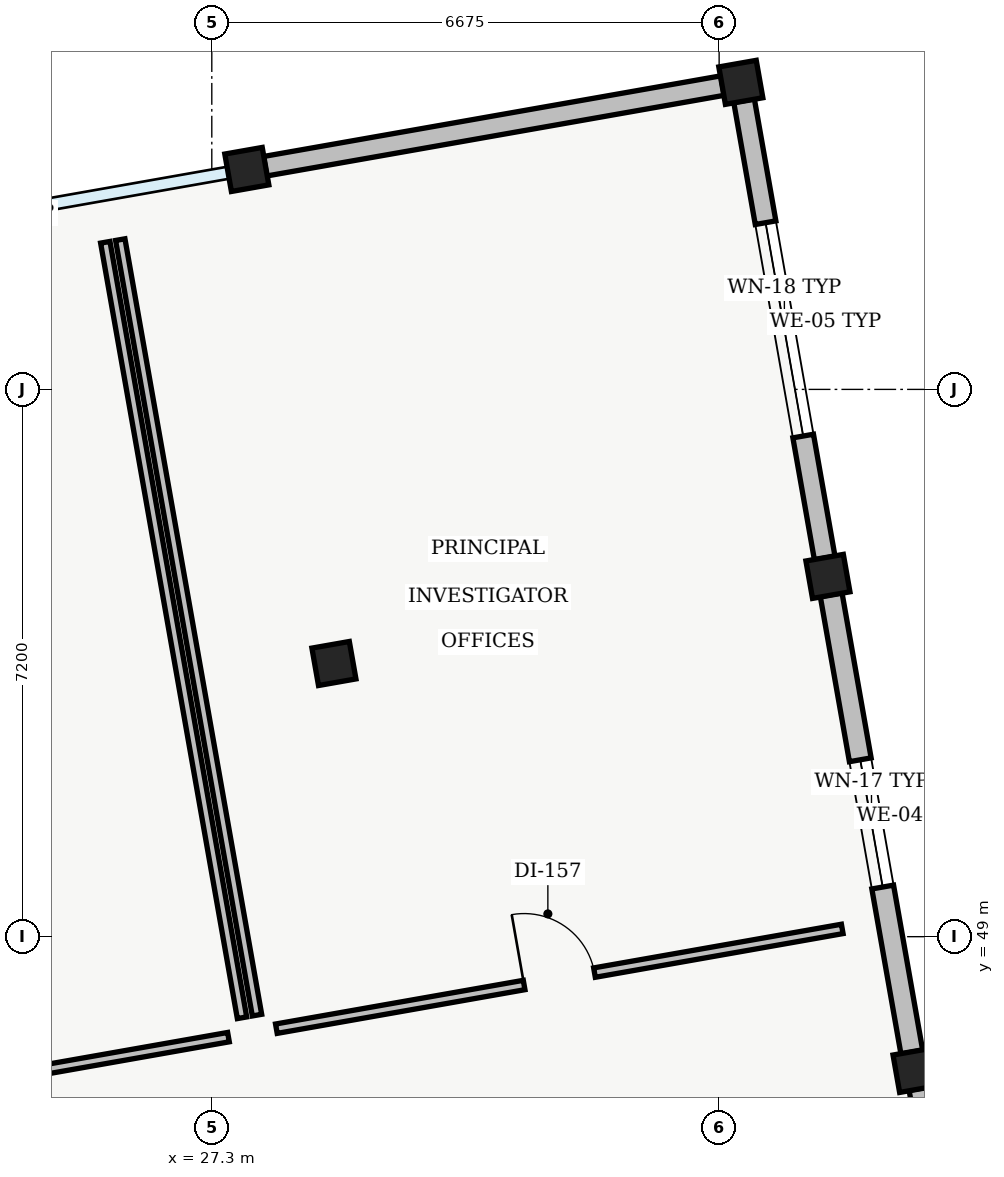
"""IFC4 building model, lengths in metres.
Left out: names, types, materials, properties, quantities, classifications, styles, units other than length and angle.
Written with IfcOpenShell. Run it as: python <this file> out.ifc"""

import sys

from ifc_helpers import new_model, si_unit, direction, frame, frame_2d, origin, origin_2d, place, context, subcontext, project, spatial, rectangle, extrude, element, fill, save


model = new_model("IFC4")
c1 = context("Model", 3, precision=1e-05, world=origin(), true_north=direction((0.0, 1.0)))
c2 = subcontext(c1, "Body", "Model", "MODEL_VIEW")
j1 = project(units=[si_unit("LENGTHUNIT", "METRE"), si_unit("PLANEANGLEUNIT", "RADIAN")], contexts=[c1])
p1 = place(None, origin())
s1 = spatial("IfcSite", under=j1, at=p1, CompositionType="ELEMENT")
p2 = place(p1, origin())
s2 = spatial("IfcBuilding", under=s1, at=p2, CompositionType="ELEMENT")
p3 = place(p2, frame((0.0, 0.0, 40.8)))
s3 = spatial("IfcBuildingStorey", under=s2, at=p3, CompositionType="ELEMENT", Elevation=40.8)
for number, where, z_axis, x_axis in (
    (1, (28.907, 52.594, 0.0), (0.0, 0.0, 1.0), (0.985, 0.174, 0.0)),
    (2, (27.761, 59.094, 0.0), (0.0, 0.0, 1.0), (0.985, 0.174, 0.0)),
    (3, (36.552, 47.24, 0.0), (0.0, 0.0, 1.0), (0.985, 0.174, 0.0)),
    (4, (35.406, 53.74, 0.0), (0.0, 0.0, 1.0), (0.985, 0.174, 0.0)),
    (5, (34.26, 60.24, 0.0), (0.0, 0.0, 1.0), (0.985, 0.174, 0.0)),
):
    element("IfcColumn", number, at=place(p3, frame(where, z_axis=z_axis, x_axis=x_axis)), inside=s3, PredefinedType="COLUMN", context=c2, shape_type="SweptSolid", body=[
        extrude(rectangle(XDim=0.5, YDim=0.5, at=origin_2d()), origin(), (0.0, 0.0, 1.0), 4.01),
    ])
p4 = place(p3, frame((28.002, 59.136, 0.0), z_axis=(0.0, 0.0, 1.0), x_axis=(0.98480607723, 0.173657681232, 0.0)))
e6 = element("IfcWall", 6, at=p4, inside=s3, PredefinedType="STANDARD", context=c2, shape_type="SweptSolid", body=[
    extrude(rectangle(XDim=6.11, YDim=0.26, at=frame_2d((3.055, 0.0))), origin(), (0.0, 0.0, 1.0), 3.495),
])
p5 = place(p3, frame((34.303, 59.998, 0.0), z_axis=(0.0, 0.0, 1.0), x_axis=(0.173657681232, -0.98480607723, 0.0)))
e7 = element("IfcWall", 7, at=p5, inside=s3, PredefinedType="STANDARD", context=c2, shape_type="SweptSolid", body=[
    extrude(rectangle(XDim=6.11, YDim=0.275, at=frame_2d((3.055, 0.0))), origin(), (0.0, 0.0, 1.0), 3.495),
])
p6 = place(p5, frame((1.63, 0.0, 0.95)))
e8 = element("IfcOpeningElement", 8, at=p6, cuts=e7, PredefinedType="OPENING", context=c2, shape_type="SweptSolid", body=[
    extrude(rectangle(XDim=2.85, YDim=1.5, at=frame_2d((1.425, 0.75))), frame((0.0, 0.137, 0.0), z_axis=(0.0, -1.0, 0.0), x_axis=(1.0, 0.0, 0.0)), (0.0, 0.0, 1.0), 0.275),
])
p7 = place(p3, frame((35.449, 53.499, 0.0), z_axis=(0.0, 0.0, 1.0), x_axis=(0.173657681232, -0.98480607723, 0.0)))
e9 = element("IfcWall", 9, at=p7, inside=s3, PredefinedType="STANDARD", context=c2, shape_type="SweptSolid", body=[
    extrude(rectangle(XDim=6.11, YDim=0.29, at=frame_2d((3.055, 0.0))), origin(), (0.0, 0.0, 1.0), 3.495),
])
p8 = place(p7, frame((2.205, 0.0, 0.95)))
e10 = element("IfcOpeningElement", 10, at=p8, cuts=e9, PredefinedType="OPENING", context=c2, shape_type="SweptSolid", body=[
    extrude(rectangle(XDim=1.7, YDim=1.55, at=frame_2d((0.85, 0.775))), frame((0.0, 0.145, 0.0), z_axis=(0.0, -1.0, 0.0), x_axis=(1.0, 0.0, 0.0)), (0.0, 0.0, 1.0), 0.29),
])
p9 = place(p3, frame((36.595, 46.999, 0.0), z_axis=(0.0, 0.0, 1.0), x_axis=(0.173618927794, -0.984812910106, 0.0)))
e11 = element("IfcWall", 11, at=p9, inside=s3, PredefinedType="STANDARD", context=c2, shape_type="SweptSolid", body=[
    extrude(rectangle(XDim=6.11, YDim=0.245, at=frame_2d((3.055, 0.0))), origin(), (0.0, 0.0, 1.0), 3.495),
])
p10 = place(p9, frame((2.48, 0.0, 0.95)))
e12 = element("IfcOpeningElement", 12, at=p10, cuts=e11, PredefinedType="OPENING", context=c2, shape_type="SweptSolid", body=[
    extrude(rectangle(XDim=1.15, YDim=1.6, at=frame_2d((0.575, 0.8))), frame((0.0, 0.123, 0.0), z_axis=(0.0, -1.0, 0.0), x_axis=(1.0, 0.0, 0.0)), (0.0, 0.0, 1.0), 0.245),
])
p11 = place(p3, frame((20.665, 46.469, 0.0), z_axis=(0.0, 0.0, 1.0), x_axis=(0.984804033539, 0.173669270527, 0.0)))
e13 = element("IfcWall", 13, at=p11, inside=s3, PredefinedType="PARTITIONING", context=c2, shape_type="SweptSolid", body=[
    extrude(rectangle(XDim=6.96, YDim=0.125, at=frame_2d((3.48, 0.0))), origin(), (0.0, 0.0, 1.0), 3.65),
])
p12 = place(p11, frame((3.01, 0.0, 0.0)))
e14 = element("IfcOpeningElement", 14, at=p12, cuts=e13, PredefinedType="OPENING", context=c2, shape_type="SweptSolid", body=[
    extrude(rectangle(XDim=0.94, YDim=2.12, at=frame_2d((0.47, 1.06))), frame((0.0, 0.062, 0.0), z_axis=(0.0, -1.0, 0.0), x_axis=(1.0, 0.0, 0.0)), (0.0, 0.0, 1.0), 0.125),
])
p13 = place(p3, frame((27.698, 47.933, 0.0), z_axis=(0.0, 0.0, 1.0), x_axis=(-0.173654930775, 0.984806562233, 0.0)))
e15 = element("IfcWall", 15, at=p13, inside=s3, PredefinedType="PARTITIONING", context=c2, shape_type="SweptSolid", body=[
    extrude(rectangle(XDim=10.36, YDim=0.125, at=frame_2d((5.18, 0.0))), origin(), (0.0, 0.0, 1.0), 3.65),
])
p14 = place(p3, frame((28.15, 47.789, 0.0), z_axis=(0.0, 0.0, 1.0), x_axis=(0.984808257094, 0.173645318852, 0.0)))
e16 = element("IfcWall", 16, at=p14, inside=s3, PredefinedType="PARTITIONING", context=c2, shape_type="SweptSolid", body=[
    extrude(rectangle(XDim=7.56, YDim=0.125, at=frame_2d((3.78, 0.0))), origin(), (0.0, 0.0, 1.0), 3.65),
])
p15 = place(p14, frame((3.31, 0.0, 0.0)))
e17 = element("IfcOpeningElement", 17, at=p15, cuts=e16, PredefinedType="OPENING", context=c2, shape_type="SweptSolid", body=[
    extrude(rectangle(XDim=0.94, YDim=2.12, at=frame_2d((0.47, 1.06))), frame((0.0, 0.062, 0.0), z_axis=(0.0, -1.0, 0.0), x_axis=(1.0, 0.0, 0.0)), (0.0, 0.0, 1.0), 0.125),
])
p16 = place(p3, frame((26.096, 58.17, 0.0), z_axis=(0.0, 0.0, 1.0), x_axis=(0.173654930775, -0.984806562233, 0.0)))
e18 = element("IfcWall", 18, at=p16, inside=s3, PredefinedType="PARTITIONING", context=c2, shape_type="SweptSolid", body=[
    extrude(rectangle(XDim=10.36, YDim=0.125, at=frame_2d((5.18, 0.0))), origin(), (0.0, 0.0, 1.0), 3.65),
])
p17 = place(p6, origin())
e19 = element("IfcWindow", 19, at=p17, inside=s3, PartitioningType="SINGLE_PANEL", PredefinedType="WINDOW", context=c2, shape_type="SweptSolid", body=[
    extrude(rectangle(XDim=2.85, YDim=1.5, at=frame_2d((1.425, 0.75))), frame((0.0, 0.03, 0.0), z_axis=(0.0, -1.0, 0.0), x_axis=(1.0, 0.0, 0.0)), (0.0, 0.0, 1.0), 0.06),
])
fill(e8, e19)
p18 = place(p8, origin())
e20 = element("IfcWindow", 20, at=p18, inside=s3, PartitioningType="SINGLE_PANEL", PredefinedType="WINDOW", context=c2, shape_type="SweptSolid", body=[
    extrude(rectangle(XDim=1.7, YDim=1.55, at=frame_2d((0.85, 0.775))), frame((0.0, 0.03, 0.0), z_axis=(0.0, -1.0, 0.0), x_axis=(1.0, 0.0, 0.0)), (0.0, 0.0, 1.0), 0.06),
])
fill(e10, e20)
p19 = place(p15, origin())
e21 = element("IfcDoor", 21, at=p19, inside=s3, OperationType="SINGLE_SWING_LEFT", PredefinedType="DOOR", context=c2, shape_type="SweptSolid", body=[
    extrude(rectangle(XDim=0.94, YDim=2.12, at=frame_2d((0.47, 1.06))), frame((0.0, 0.025, 0.0), z_axis=(0.0, -1.0, 0.0), x_axis=(1.0, 0.0, 0.0)), (0.0, 0.0, 1.0), 0.05),
])
fill(e17, e21)
save(model, sys.argv[1])
